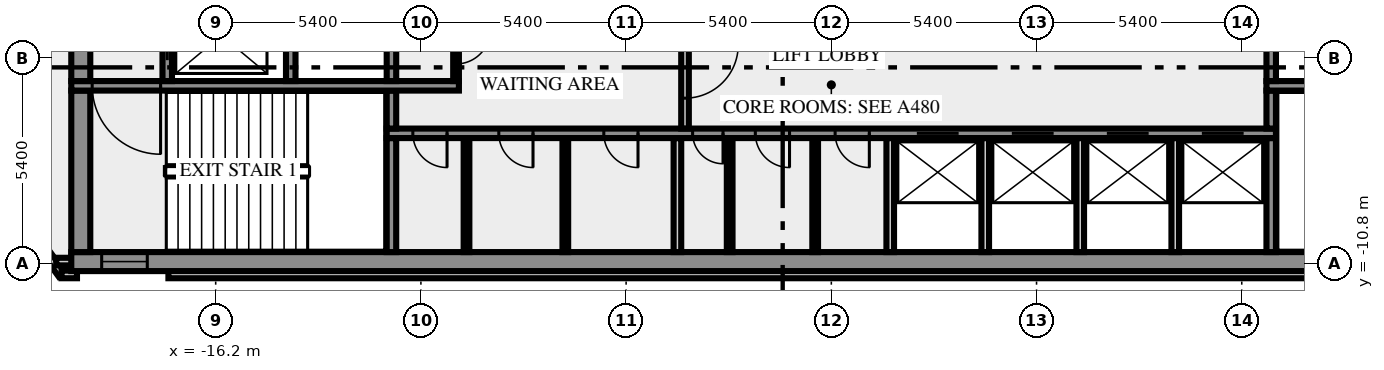
"""IFC4 building model, lengths in metres.
Left out: names, types, materials, properties, quantities, classifications, styles, units other than length and angle.
Written with IfcOpenShell. Run it as: python <this file> out.ifc"""

import sys

from ifc_helpers import new_model, si_unit, direction, frame, frame_2d, origin, place, context, subcontext, project, spatial, rectangle, extrude, element, fill, save


model = new_model("IFC4")
c1 = context("Model", 3, precision=1e-05, world=origin(), true_north=direction((0.0, 1.0)))
c2 = subcontext(c1, "Body", "Model", "MODEL_VIEW")
j1 = project(units=[si_unit("LENGTHUNIT", "METRE"), si_unit("PLANEANGLEUNIT", "RADIAN")], contexts=[c1])
p1 = place(None, origin())
s1 = spatial("IfcSite", under=j1, at=p1, CompositionType="ELEMENT")
p2 = place(p1, origin())
s2 = spatial("IfcBuilding", under=s1, at=p2, CompositionType="ELEMENT")
p3 = place(p2, frame((0.0, 0.0, 152.0)))
s3 = spatial("IfcBuildingStorey", under=s2, at=p3, CompositionType="ELEMENT", Elevation=152.0)
p4 = place(p3, frame((-21.833, -8.909, 0.0), z_axis=(0.0, 0.0, 1.0), x_axis=(0.587766567315, -0.809030569476, 0.0)))
e1 = element("IfcWall", 1, at=p4, inside=s3, PredefinedType="SOLIDWALL", context=c2, shape_type="SweptSolid", body=[
    extrude(rectangle(XDim=2.688, YDim=0.2, at=frame_2d((1.344, 0.0))), origin(), (0.0, 0.0, 1.0), 3.65),
])
p5 = place(p3, frame((-20.256, -11.088, 0.0), z_axis=(0.0, 0.0, 1.0), x_axis=(1.0, 0.0, 0.0)))
e2 = element("IfcWall", 2, at=p5, inside=s3, PredefinedType="SOLIDWALL", context=c2, shape_type="SweptSolid", body=[
    extrude(rectangle(XDim=0.406, YDim=0.2, at=frame_2d((0.203, 0.0))), origin(), (0.0, 0.0, 1.0), 3.65),
])
p6 = place(p3, frame((-17.444, -11.088, 0.0), z_axis=(0.0, 0.0, 1.0), x_axis=(1.0, 0.0, 0.0)))
e3 = element("IfcWall", 3, at=p6, inside=s3, PredefinedType="SOLIDWALL", context=c2, shape_type="SweptSolid", body=[
    extrude(rectangle(XDim=34.888, YDim=0.2, at=frame_2d((17.444, 0.0))), origin(), (0.0, 0.0, 1.0), 3.65),
])
p7 = place(p3, frame((-19.98, -10.75, 0.0), z_axis=(0.0, 0.0, 1.0), x_axis=(-1.0, 0.0, 0.0)))
e4 = element("IfcWall", 4, at=p7, inside=s3, PredefinedType="SOLIDWALL", context=c2, shape_type="SweptSolid", body=[
    extrude(rectangle(XDim=0.417, YDim=0.2, at=frame_2d((0.208, 0.0))), origin(), (0.0, 0.0, 1.0), 3.65),
])
p8 = place(p3, frame((-20.0, -10.75, 0.0), z_axis=(0.0, 0.0, 1.0), x_axis=(1.0, 0.0, 0.0)))
e5 = element("IfcWall", 5, at=p8, inside=s3, PredefinedType="SHEAR", context=c2, shape_type="SweptSolid", body=[
    extrude(rectangle(XDim=40.0, YDim=0.5, at=frame_2d((20.0, 0.0))), origin(), (0.0, 0.0, 1.0), 3.65),
])
p9 = place(p8, frame((0.8, 0.0, 1.0)))
e6 = element("IfcOpeningElement", 6, at=p9, cuts=e5, PredefinedType="OPENING", context=c2, shape_type="SweptSolid", body=[
    extrude(rectangle(XDim=1.2, YDim=1.2, at=frame_2d((0.6, 0.6))), frame((0.0, 0.26, 0.0), z_axis=(0.0, -1.0, 0.0), x_axis=(1.0, 0.0, 0.0)), (0.0, 0.0, 1.0), 0.52),
])
p10 = place(p8, frame((38.0, 0.0, 1.0)))
e7 = element("IfcOpeningElement", 7, at=p10, cuts=e5, PredefinedType="OPENING", context=c2, shape_type="SweptSolid", body=[
    extrude(rectangle(XDim=1.2, YDim=1.2, at=frame_2d((0.6, 0.6))), frame((0.0, 0.26, 0.0), z_axis=(0.0, -1.0, 0.0), x_axis=(1.0, 0.0, 0.0)), (0.0, 0.0, 1.0), 0.52),
])
p11 = place(p3, frame((-19.75, -10.5, 0.0), z_axis=(0.0, 0.0, 1.0), x_axis=(0.0, 1.0, 0.0)))
e8 = element("IfcWall", 8, at=p11, inside=s3, PredefinedType="SHEAR", context=c2, shape_type="SweptSolid", body=[
    extrude(rectangle(XDim=4.25, YDim=0.5, at=frame_2d((2.125, 0.0))), origin(), (0.0, 0.0, 1.0), 3.65),
])
p12 = place(p3, frame((-11.575, -10.5, 0.0), z_axis=(0.0, 0.0, 1.0), x_axis=(0.0, 1.0, 0.0)))
e9 = element("IfcWall", 9, at=p12, inside=s3, PredefinedType="SHEAR", context=c2, shape_type="SweptSolid", body=[
    extrude(rectangle(XDim=3.0, YDim=0.25, at=frame_2d((1.5, 0.0))), origin(), (0.0, 0.0, 1.0), 3.65),
])
for number, where, z_axis, x_axis in (
    (10, (-9.6, -10.5, 0.0), (0.0, 0.0, 1.0), (0.0, 1.0, 0.0)),
    (11, (-7.0, -10.5, 0.0), (0.0, 0.0, 1.0), (0.0, 1.0, 0.0)),
):
    element("IfcWall", number, at=place(p3, frame(where, z_axis=z_axis, x_axis=x_axis)), inside=s3, PredefinedType="PARTITIONING", context=c2, shape_type="SweptSolid", body=[
        extrude(rectangle(XDim=3.0, YDim=0.15, at=frame_2d((1.5, 0.0))), origin(), (0.0, 0.0, 1.0), 3.65),
    ])
p13 = place(p3, frame((-4.05, -10.5, 0.0), z_axis=(0.0, 0.0, 1.0), x_axis=(0.0, 1.0, 0.0)))
e12 = element("IfcWall", 12, at=p13, inside=s3, PredefinedType="SOLIDWALL", context=c2, shape_type="SweptSolid", body=[
    extrude(rectangle(XDim=3.0, YDim=0.2, at=frame_2d((1.5, 0.0))), origin(), (0.0, 0.0, 1.0), 3.65),
])
for number, where, z_axis, x_axis in (
    (13, (-2.675, -10.5, 0.0), (0.0, 0.0, 1.0), (0.0, 1.0, 0.0)),
    (14, (-0.425, -10.5, 0.0), (0.0, 0.0, 1.0), (0.0, 1.0, 0.0)),
):
    element("IfcWall", number, at=place(p3, frame(where, z_axis=z_axis, x_axis=x_axis)), inside=s3, PredefinedType="PARTITIONING", context=c2, shape_type="SweptSolid", body=[
        extrude(rectangle(XDim=3.0, YDim=0.15, at=frame_2d((1.5, 0.0))), origin(), (0.0, 0.0, 1.0), 3.65),
    ])
for number, where, z_axis, x_axis in (
    (15, (1.55, -10.5, 0.0), (0.0, 0.0, 1.0), (0.0, 1.0, 0.0)),
    (16, (4.05, -10.5, 0.0), (0.0, 0.0, 1.0), (0.0, 1.0, 0.0)),
    (17, (6.55, -10.5, 0.0), (0.0, 0.0, 1.0), (0.0, 1.0, 0.0)),
    (18, (9.05, -10.5, 0.0), (0.0, 0.0, 1.0), (0.0, 1.0, 0.0)),
):
    element("IfcWall", number, at=place(p3, frame(where, z_axis=z_axis, x_axis=x_axis)), inside=s3, PredefinedType="SOLIDWALL", context=c2, shape_type="SweptSolid", body=[
        extrude(rectangle(XDim=3.0, YDim=0.2, at=frame_2d((1.5, 0.0))), origin(), (0.0, 0.0, 1.0), 3.65),
    ])
p14 = place(p3, frame((11.575, -10.5, 0.0), z_axis=(0.0, 0.0, 1.0), x_axis=(0.0, 1.0, 0.0)))
e19 = element("IfcWall", 19, at=p14, inside=s3, PredefinedType="SHEAR", context=c2, shape_type="SweptSolid", body=[
    extrude(rectangle(XDim=3.0, YDim=0.25, at=frame_2d((1.5, 0.0))), origin(), (0.0, 0.0, 1.0), 3.65),
])
p15 = place(p3, frame((11.7, -7.375, 0.0), z_axis=(0.0, 0.0, 1.0), x_axis=(-1.0, 0.0, 0.0)))
e20 = element("IfcWall", 20, at=p15, inside=s3, PredefinedType="SHEAR", context=c2, shape_type="SweptSolid", body=[
    extrude(rectangle(XDim=23.4, YDim=0.25, at=frame_2d((11.7, 0.0))), origin(), (0.0, 0.0, 1.0), 3.65),
])
p16 = place(p15, frame((21.812, 0.0, 0.0)))
e21 = element("IfcOpeningElement", 21, at=p16, cuts=e20, PredefinedType="OPENING", context=c2, shape_type="SweptSolid", body=[
    extrude(rectangle(XDim=0.9, YDim=2.1, at=frame_2d((0.45, 1.05))), frame((0.0, 0.135, 0.0), z_axis=(0.0, -1.0, 0.0), x_axis=(1.0, 0.0, 0.0)), (0.0, 0.0, 1.0), 0.27),
])
p17 = place(p15, frame((19.55, 0.0, 0.0)))
e22 = element("IfcOpeningElement", 22, at=p17, cuts=e20, PredefinedType="OPENING", context=c2, shape_type="SweptSolid", body=[
    extrude(rectangle(XDim=0.9, YDim=2.1, at=frame_2d((0.45, 1.05))), frame((0.0, 0.135, 0.0), z_axis=(0.0, -1.0, 0.0), x_axis=(1.0, 0.0, 0.0)), (0.0, 0.0, 1.0), 0.27),
])
p18 = place(p15, frame((16.787, 0.0, 0.0)))
e23 = element("IfcOpeningElement", 23, at=p18, cuts=e20, PredefinedType="OPENING", context=c2, shape_type="SweptSolid", body=[
    extrude(rectangle(XDim=0.9, YDim=2.1, at=frame_2d((0.45, 1.05))), frame((0.0, 0.135, 0.0), z_axis=(0.0, -1.0, 0.0), x_axis=(1.0, 0.0, 0.0)), (0.0, 0.0, 1.0), 0.27),
])
p19 = place(p15, frame((14.55, 0.0, 0.0)))
e24 = element("IfcOpeningElement", 24, at=p19, cuts=e20, PredefinedType="OPENING", context=c2, shape_type="SweptSolid", body=[
    extrude(rectangle(XDim=0.8, YDim=2.1, at=frame_2d((0.4, 1.05))), frame((0.0, 0.135, 0.0), z_axis=(0.0, -1.0, 0.0), x_axis=(1.0, 0.0, 0.0)), (0.0, 0.0, 1.0), 0.27),
])
p20 = place(p15, frame((12.8, 0.0, 0.0)))
e25 = element("IfcOpeningElement", 25, at=p20, cuts=e20, PredefinedType="OPENING", context=c2, shape_type="SweptSolid", body=[
    extrude(rectangle(XDim=0.9, YDim=2.1, at=frame_2d((0.45, 1.05))), frame((0.0, 0.135, 0.0), z_axis=(0.0, -1.0, 0.0), x_axis=(1.0, 0.0, 0.0)), (0.0, 0.0, 1.0), 0.27),
])
p21 = place(p15, frame((10.7, 0.0, 0.0)))
e26 = element("IfcOpeningElement", 26, at=p21, cuts=e20, PredefinedType="OPENING", context=c2, shape_type="SweptSolid", body=[
    extrude(rectangle(XDim=0.9, YDim=2.1, at=frame_2d((0.45, 1.05))), frame((0.0, 0.135, 0.0), z_axis=(0.0, -1.0, 0.0), x_axis=(1.0, 0.0, 0.0)), (0.0, 0.0, 1.0), 0.27),
])
p22 = place(p15, frame((8.35, 0.0, 0.0)))
e27 = element("IfcOpeningElement", 27, at=p22, cuts=e20, PredefinedType="OPENING", context=c2, shape_type="SweptSolid", body=[
    extrude(rectangle(XDim=1.1, YDim=2.1, at=frame_2d((0.55, 1.05))), frame((0.0, 0.135, 0.0), z_axis=(0.0, -1.0, 0.0), x_axis=(1.0, 0.0, 0.0)), (0.0, 0.0, 1.0), 0.27),
])
p23 = place(p15, frame((5.85, 0.0, 0.0)))
e28 = element("IfcOpeningElement", 28, at=p23, cuts=e20, PredefinedType="OPENING", context=c2, shape_type="SweptSolid", body=[
    extrude(rectangle(XDim=1.1, YDim=2.1, at=frame_2d((0.55, 1.05))), frame((0.0, 0.135, 0.0), z_axis=(0.0, -1.0, 0.0), x_axis=(1.0, 0.0, 0.0)), (0.0, 0.0, 1.0), 0.27),
])
p24 = place(p15, frame((3.35, 0.0, 0.0)))
e29 = element("IfcOpeningElement", 29, at=p24, cuts=e20, PredefinedType="OPENING", context=c2, shape_type="SweptSolid", body=[
    extrude(rectangle(XDim=1.1, YDim=2.1, at=frame_2d((0.55, 1.05))), frame((0.0, 0.135, 0.0), z_axis=(0.0, -1.0, 0.0), x_axis=(1.0, 0.0, 0.0)), (0.0, 0.0, 1.0), 0.27),
])
p25 = place(p15, frame((0.85, 0.0, 0.0)))
e30 = element("IfcOpeningElement", 30, at=p25, cuts=e20, PredefinedType="OPENING", context=c2, shape_type="SweptSolid", body=[
    extrude(rectangle(XDim=1.1, YDim=2.1, at=frame_2d((0.55, 1.05))), frame((0.0, 0.135, 0.0), z_axis=(0.0, -1.0, 0.0), x_axis=(1.0, 0.0, 0.0)), (0.0, 0.0, 1.0), 0.27),
])
p26 = place(p3, frame((-11.575, -7.25, 0.0), z_axis=(0.0, 0.0, 1.0), x_axis=(0.0, 1.0, 0.0)))
e31 = element("IfcWall", 31, at=p26, inside=s3, PredefinedType="SHEAR", context=c2, shape_type="SweptSolid", body=[
    extrude(rectangle(XDim=1.0, YDim=0.25, at=frame_2d((0.5, 0.0))), origin(), (0.0, 0.0, 1.0), 3.65),
])
p27 = place(p3, frame((-3.85, -4.25, 0.0), z_axis=(0.0, 0.0, 1.0), x_axis=(0.0, -1.0, 0.0)))
e32 = element("IfcWall", 32, at=p27, inside=s3, PredefinedType="SOLIDWALL", context=c2, shape_type="SweptSolid", body=[
    extrude(rectangle(XDim=3.0, YDim=0.2, at=frame_2d((1.5, 0.0))), origin(), (0.0, 0.0, 1.0), 3.65),
])
p28 = place(p27, frame((0.8, 0.0, 0.0)))
e33 = element("IfcOpeningElement", 33, at=p28, cuts=e32, PredefinedType="OPENING", context=c2, shape_type="SweptSolid", body=[
    extrude(rectangle(XDim=1.4, YDim=2.1, at=frame_2d((0.7, 1.05))), frame((0.0, 0.11, 0.0), z_axis=(0.0, -1.0, 0.0), x_axis=(1.0, 0.0, 0.0)), (0.0, 0.0, 1.0), 0.22),
])
p29 = place(p3, frame((11.575, -7.25, 0.0), z_axis=(0.0, 0.0, 1.0), x_axis=(0.0, 1.0, 0.0)))
e34 = element("IfcWall", 34, at=p29, inside=s3, PredefinedType="SHEAR", context=c2, shape_type="SweptSolid", body=[
    extrude(rectangle(XDim=1.0, YDim=0.25, at=frame_2d((0.5, 0.0))), origin(), (0.0, 0.0, 1.0), 3.65),
])
p30 = place(p3, frame((-9.8, -6.125, 0.0), z_axis=(0.0, 0.0, 1.0), x_axis=(-1.0, 0.0, 0.0)))
e35 = element("IfcWall", 35, at=p30, inside=s3, PredefinedType="SHEAR", context=c2, shape_type="SweptSolid", body=[
    extrude(rectangle(XDim=10.2, YDim=0.25, at=frame_2d((5.1, 0.0))), origin(), (0.0, 0.0, 1.0), 3.65),
])
p31 = place(p30, frame((7.85, 0.0, 0.0)))
e36 = element("IfcOpeningElement", 36, at=p31, cuts=e35, PredefinedType="OPENING", context=c2, shape_type="SweptSolid", body=[
    extrude(rectangle(XDim=1.8, YDim=2.1, at=frame_2d((0.9, 1.05))), frame((0.0, 0.135, 0.0), z_axis=(0.0, -1.0, 0.0), x_axis=(1.0, 0.0, 0.0)), (0.0, 0.0, 1.0), 0.27),
])
p32 = place(p3, frame((19.5, -6.125, 0.0), z_axis=(0.0, 0.0, 1.0), x_axis=(-1.0, 0.0, 0.0)))
e37 = element("IfcWall", 37, at=p32, inside=s3, PredefinedType="SHEAR", context=c2, shape_type="SweptSolid", body=[
    extrude(rectangle(XDim=8.05, YDim=0.25, at=frame_2d((4.025, 0.0))), origin(), (0.0, 0.0, 1.0), 3.65),
])
p33 = place(p32, frame((0.05, 0.0, 0.0)))
e38 = element("IfcOpeningElement", 38, at=p33, cuts=e37, PredefinedType="OPENING", context=c2, shape_type="SweptSolid", body=[
    extrude(rectangle(XDim=1.8, YDim=2.1, at=frame_2d((0.9, 1.05))), frame((0.0, 0.135, 0.0), z_axis=(0.0, -1.0, 0.0), x_axis=(1.0, 0.0, 0.0)), (0.0, 0.0, 1.0), 0.27),
])
p34 = place(p3, frame((-19.75, -6.0, 0.0), z_axis=(0.0, 0.0, 1.0), x_axis=(0.0, 1.0, 0.0)))
e39 = element("IfcWall", 39, at=p34, inside=s3, PredefinedType="SHEAR", context=c2, shape_type="SweptSolid", body=[
    extrude(rectangle(XDim=4.3, YDim=0.5, at=frame_2d((2.15, 0.0))), origin(), (0.0, 0.0, 1.0), 3.65),
])
p35 = place(p3, frame((-17.475, -6.0, 0.0), z_axis=(0.0, 0.0, 1.0), x_axis=(0.0, 1.0, 0.0)))
e40 = element("IfcWall", 40, at=p35, inside=s3, PredefinedType="SHEAR", context=c2, shape_type="SweptSolid", body=[
    extrude(rectangle(XDim=4.3, YDim=0.25, at=frame_2d((2.15, 0.0))), origin(), (0.0, 0.0, 1.0), 3.65),
])
p36 = place(p35, frame((0.55, 0.0, 0.0)))
e41 = element("IfcOpeningElement", 41, at=p36, cuts=e40, PredefinedType="OPENING", context=c2, shape_type="SweptSolid", body=[
    extrude(rectangle(XDim=1.3, YDim=2.1, at=frame_2d((0.65, 1.05))), frame((0.0, 0.135, 0.0), z_axis=(0.0, -1.0, 0.0), x_axis=(1.0, 0.0, 0.0)), (0.0, 0.0, 1.0), 0.27),
])
p37 = place(p3, frame((-14.225, -6.0, 0.0), z_axis=(0.0, 0.0, 1.0), x_axis=(0.0, 1.0, 0.0)))
e42 = element("IfcWall", 42, at=p37, inside=s3, PredefinedType="SHEAR", context=c2, shape_type="SweptSolid", body=[
    extrude(rectangle(XDim=4.3, YDim=0.25, at=frame_2d((2.15, 0.0))), origin(), (0.0, 0.0, 1.0), 3.65),
])
p38 = place(p3, frame((-11.575, -6.0, 0.0), z_axis=(0.0, 0.0, 1.0), x_axis=(0.0, 1.0, 0.0)))
e43 = element("IfcWall", 43, at=p38, inside=s3, PredefinedType="SHEAR", context=c2, shape_type="SweptSolid", body=[
    extrude(rectangle(XDim=1.75, YDim=0.25, at=frame_2d((0.875, 0.0))), origin(), (0.0, 0.0, 1.0), 3.65),
])
p39 = place(p3, frame((-9.875, -4.25, 0.0), z_axis=(0.0, 0.0, 1.0), x_axis=(0.0, -1.0, 0.0)))
e44 = element("IfcWall", 44, at=p39, inside=s3, PredefinedType="PARTITIONING", context=c2, shape_type="SweptSolid", body=[
    extrude(rectangle(XDim=1.75, YDim=0.15, at=frame_2d((0.875, 0.0))), origin(), (0.0, 0.0, 1.0), 3.65),
])
p40 = place(p39, frame((0.4, 0.0, 0.0)))
e45 = element("IfcOpeningElement", 45, at=p40, cuts=e44, PredefinedType="OPENING", context=c2, shape_type="SweptSolid", body=[
    extrude(rectangle(XDim=0.9, YDim=2.1, at=frame_2d((0.45, 1.05))), frame((0.0, 0.085, 0.0), z_axis=(0.0, -1.0, 0.0), x_axis=(1.0, 0.0, 0.0)), (0.0, 0.0, 1.0), 0.17),
])
p41 = place(p3, frame((11.575, -6.0, 0.0), z_axis=(0.0, 0.0, 1.0), x_axis=(0.0, 1.0, 0.0)))
e46 = element("IfcWall", 46, at=p41, inside=s3, PredefinedType="SHEAR", context=c2, shape_type="SweptSolid", body=[
    extrude(rectangle(XDim=1.75, YDim=0.25, at=frame_2d((0.875, 0.0))), origin(), (0.0, 0.0, 1.0), 3.65),
])
p42 = place(p9, origin())
e47 = element("IfcWindow", 47, at=p42, inside=s3, PartitioningType="SINGLE_PANEL", PredefinedType="WINDOW", context=c2, shape_type="SweptSolid", body=[
    extrude(rectangle(XDim=1.2, YDim=1.2, at=frame_2d((0.6, 0.6))), frame((0.0, 0.03, 0.0), z_axis=(0.0, -1.0, 0.0), x_axis=(1.0, 0.0, 0.0)), (0.0, 0.0, 1.0), 0.06),
])
fill(e6, e47)
p43 = place(p16, origin())
e48 = element("IfcDoor", 48, at=p43, inside=s3, OperationType="SINGLE_SWING_RIGHT", PredefinedType="DOOR", context=c2, shape_type="SweptSolid", body=[
    extrude(rectangle(XDim=0.9, YDim=2.1, at=frame_2d((0.45, 1.05))), frame((0.0, 0.025, 0.0), z_axis=(0.0, -1.0, 0.0), x_axis=(1.0, 0.0, 0.0)), (0.0, 0.0, 1.0), 0.05),
])
fill(e21, e48)
p44 = place(p17, origin())
e49 = element("IfcDoor", 49, at=p44, inside=s3, OperationType="SINGLE_SWING_RIGHT", PredefinedType="DOOR", context=c2, shape_type="SweptSolid", body=[
    extrude(rectangle(XDim=0.9, YDim=2.1, at=frame_2d((0.45, 1.05))), frame((0.0, 0.025, 0.0), z_axis=(0.0, -1.0, 0.0), x_axis=(1.0, 0.0, 0.0)), (0.0, 0.0, 1.0), 0.05),
])
fill(e22, e49)
p45 = place(p18, origin())
e50 = element("IfcDoor", 50, at=p45, inside=s3, OperationType="SINGLE_SWING_RIGHT", PredefinedType="DOOR", context=c2, shape_type="SweptSolid", body=[
    extrude(rectangle(XDim=0.9, YDim=2.1, at=frame_2d((0.45, 1.05))), frame((0.0, 0.025, 0.0), z_axis=(0.0, -1.0, 0.0), x_axis=(1.0, 0.0, 0.0)), (0.0, 0.0, 1.0), 0.05),
])
fill(e23, e50)
p46 = place(p19, origin())
e51 = element("IfcDoor", 51, at=p46, inside=s3, OperationType="SINGLE_SWING_RIGHT", PredefinedType="DOOR", context=c2, shape_type="SweptSolid", body=[
    extrude(rectangle(XDim=0.8, YDim=2.1, at=frame_2d((0.4, 1.05))), frame((0.0, 0.025, 0.0), z_axis=(0.0, -1.0, 0.0), x_axis=(1.0, 0.0, 0.0)), (0.0, 0.0, 1.0), 0.05),
])
fill(e24, e51)
p47 = place(p20, origin())
e52 = element("IfcDoor", 52, at=p47, inside=s3, OperationType="SINGLE_SWING_RIGHT", PredefinedType="DOOR", context=c2, shape_type="SweptSolid", body=[
    extrude(rectangle(XDim=0.9, YDim=2.1, at=frame_2d((0.45, 1.05))), frame((0.0, 0.025, 0.0), z_axis=(0.0, -1.0, 0.0), x_axis=(1.0, 0.0, 0.0)), (0.0, 0.0, 1.0), 0.05),
])
fill(e25, e52)
p48 = place(p21, origin())
e53 = element("IfcDoor", 53, at=p48, inside=s3, OperationType="SINGLE_SWING_LEFT", PredefinedType="DOOR", context=c2, shape_type="SweptSolid", body=[
    extrude(rectangle(XDim=0.9, YDim=2.1, at=frame_2d((0.45, 1.05))), frame((0.0, 0.025, 0.0), z_axis=(0.0, -1.0, 0.0), x_axis=(1.0, 0.0, 0.0)), (0.0, 0.0, 1.0), 0.05),
])
fill(e26, e53)
p49 = place(p22, origin())
e54 = element("IfcDoor", 54, at=p49, inside=s3, OperationType="DOUBLE_DOOR_SLIDING", PredefinedType="DOOR", context=c2, shape_type="SweptSolid", body=[
    extrude(rectangle(XDim=1.1, YDim=2.1, at=frame_2d((0.55, 1.05))), frame((0.0, 0.025, 0.0), z_axis=(0.0, -1.0, 0.0), x_axis=(1.0, 0.0, 0.0)), (0.0, 0.0, 1.0), 0.05),
])
fill(e27, e54)
p50 = place(p23, origin())
e55 = element("IfcDoor", 55, at=p50, inside=s3, OperationType="DOUBLE_DOOR_SLIDING", PredefinedType="DOOR", context=c2, shape_type="SweptSolid", body=[
    extrude(rectangle(XDim=1.1, YDim=2.1, at=frame_2d((0.55, 1.05))), frame((0.0, 0.025, 0.0), z_axis=(0.0, -1.0, 0.0), x_axis=(1.0, 0.0, 0.0)), (0.0, 0.0, 1.0), 0.05),
])
fill(e28, e55)
p51 = place(p24, origin())
e56 = element("IfcDoor", 56, at=p51, inside=s3, OperationType="DOUBLE_DOOR_SLIDING", PredefinedType="DOOR", context=c2, shape_type="SweptSolid", body=[
    extrude(rectangle(XDim=1.1, YDim=2.1, at=frame_2d((0.55, 1.05))), frame((0.0, 0.025, 0.0), z_axis=(0.0, -1.0, 0.0), x_axis=(1.0, 0.0, 0.0)), (0.0, 0.0, 1.0), 0.05),
])
fill(e29, e56)
p52 = place(p25, origin())
e57 = element("IfcDoor", 57, at=p52, inside=s3, OperationType="DOUBLE_DOOR_SLIDING", PredefinedType="DOOR", context=c2, shape_type="SweptSolid", body=[
    extrude(rectangle(XDim=1.1, YDim=2.1, at=frame_2d((0.55, 1.05))), frame((0.0, 0.025, 0.0), z_axis=(0.0, -1.0, 0.0), x_axis=(1.0, 0.0, 0.0)), (0.0, 0.0, 1.0), 0.05),
])
fill(e30, e57)
p53 = place(p28, origin())
e58 = element("IfcDoor", 58, at=p53, inside=s3, OperationType="DOUBLE_DOOR_SINGLE_SWING", PredefinedType="DOOR", context=c2, shape_type="SweptSolid", body=[
    extrude(rectangle(XDim=1.4, YDim=2.1, at=frame_2d((0.7, 1.05))), frame((0.0, 0.025, 0.0), z_axis=(0.0, -1.0, 0.0), x_axis=(1.0, 0.0, 0.0)), (0.0, 0.0, 1.0), 0.05),
])
fill(e33, e58)
p54 = place(p31, origin())
e59 = element("IfcDoor", 59, at=p54, inside=s3, OperationType="DOUBLE_DOOR_SINGLE_SWING", PredefinedType="DOOR", context=c2, shape_type="SweptSolid", body=[
    extrude(rectangle(XDim=1.8, YDim=2.1, at=frame_2d((0.9, 1.05))), frame((0.0, 0.025, 0.0), z_axis=(0.0, -1.0, 0.0), x_axis=(1.0, 0.0, 0.0)), (0.0, 0.0, 1.0), 0.05),
])
fill(e36, e59)
p55 = place(p36, origin())
e60 = element("IfcDoor", 60, at=p55, inside=s3, OperationType="DOUBLE_DOOR_SLIDING", PredefinedType="DOOR", context=c2, shape_type="SweptSolid", body=[
    extrude(rectangle(XDim=1.3, YDim=2.1, at=frame_2d((0.65, 1.05))), frame((0.0, 0.025, 0.0), z_axis=(0.0, -1.0, 0.0), x_axis=(1.0, 0.0, 0.0)), (0.0, 0.0, 1.0), 0.05),
])
fill(e41, e60)
p56 = place(p40, origin())
e61 = element("IfcDoor", 61, at=p56, inside=s3, OperationType="SINGLE_SWING_LEFT", PredefinedType="DOOR", context=c2, shape_type="SweptSolid", body=[
    extrude(rectangle(XDim=0.9, YDim=2.1, at=frame_2d((0.45, 1.05))), frame((0.0, 0.025, 0.0), z_axis=(0.0, -1.0, 0.0), x_axis=(1.0, 0.0, 0.0)), (0.0, 0.0, 1.0), 0.05),
])
fill(e45, e61)
save(model, sys.argv[1])
